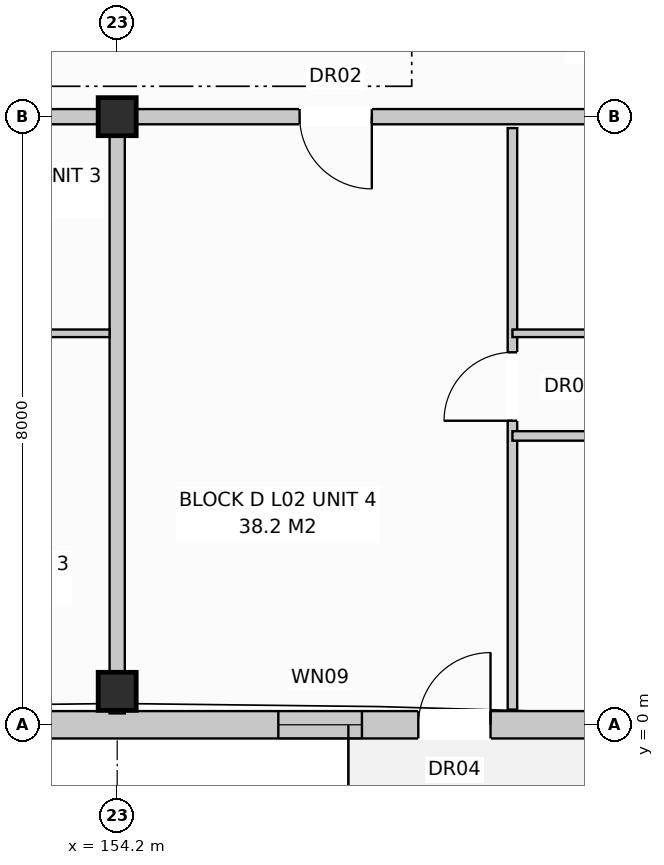
"""IFC4 building model, lengths in metres.
Left out: names, types, materials, properties, quantities, classifications, styles, units other than length and angle.
Written with IfcOpenShell. Run it as: python <this file> out.ifc"""

import sys

from ifc_helpers import new_model, si_unit, direction, frame, frame_2d, origin, origin_with_axes, origin_2d, place, context, subcontext, project, spatial, rectangle, extrude, element, fill, save


model = new_model("IFC4")
c1 = context("Model", 3, precision=1e-05, world=origin(), true_north=direction((0.0, 1.0)))
c2 = subcontext(c1, "Body", "Model", "MODEL_VIEW")
j1 = project(units=[si_unit("LENGTHUNIT", "METRE"), si_unit("PLANEANGLEUNIT", "RADIAN")], contexts=[c1])
p1 = place(None, origin())
s1 = spatial("IfcSite", under=j1, at=p1, CompositionType="ELEMENT")
p2 = place(p1, origin())
s2 = spatial("IfcBuilding", under=s1, at=p2, CompositionType="ELEMENT")
p3 = place(p2, frame((0.0, 0.0, 8.0)))
s3 = spatial("IfcBuildingStorey", under=s2, at=p3, CompositionType="ELEMENT", Elevation=8.0)
for number, where, z_axis, x_axis in (
    (1, (154.2, 0.44, 0.0), (0.0, 0.0, 1.0), (1.0, 0.0, 0.0)),
    (2, (154.2, 8.0, 0.0), (0.0, 0.0, 1.0), (1.0, 0.0, 0.0)),
):
    element("IfcColumn", number, at=place(p3, frame(where, z_axis=z_axis, x_axis=x_axis)), inside=s3, PredefinedType="COLUMN", context=c2, shape_type="SweptSolid", body=[
        extrude(rectangle(XDim=0.5, YDim=0.5, at=origin_2d()), origin(), (0.0, 0.0, 1.0), 3.2),
    ])
p4 = place(p3, frame((112.97, 0.0, 0.0), z_axis=(0.0, 0.0, 1.0), x_axis=(1.0, 0.0, 0.0)))
e3 = element("IfcWall", 3, at=p4, inside=s3, PredefinedType="STANDARD", context=c2, shape_type="SweptSolid", body=[
    extrude(rectangle(XDim=54.86, YDim=0.36, at=frame_2d((27.43, 0.0))), origin(), (0.0, 0.0, 1.0), 2.94),
])
p5 = place(p4, frame((2.788, 0.0, 0.0)))
e4 = element("IfcOpeningElement", 4, at=p5, cuts=e3, PredefinedType="OPENING", context=c2, shape_type="SweptSolid", body=[
    extrude(rectangle(XDim=0.95, YDim=2.1, at=frame_2d((0.475, 1.05))), frame((0.0, 0.192, 0.0), z_axis=(0.0, -1.0, 0.0), x_axis=(1.0, 0.0, 0.0)), (0.0, 0.0, 1.0), 0.384),
])
p6 = place(p4, frame((18.9, 0.0, 0.0)))
e5 = element("IfcOpeningElement", 5, at=p6, cuts=e3, PredefinedType="OPENING", context=c2, shape_type="SweptSolid", body=[
    extrude(rectangle(XDim=0.95, YDim=2.1, at=frame_2d((0.475, 1.05))), frame((0.0, 0.192, 0.0), z_axis=(0.0, -1.0, 0.0), x_axis=(1.0, 0.0, 0.0)), (0.0, 0.0, 1.0), 0.384),
])
p7 = place(p4, frame((30.792, 0.0, 0.0)))
e6 = element("IfcOpeningElement", 6, at=p7, cuts=e3, PredefinedType="OPENING", context=c2, shape_type="SweptSolid", body=[
    extrude(rectangle(XDim=0.95, YDim=2.1, at=frame_2d((0.475, 1.05))), frame((0.0, 0.192, 0.0), z_axis=(0.0, -1.0, 0.0), x_axis=(1.0, 0.0, 0.0)), (0.0, 0.0, 1.0), 0.384),
])
p8 = place(p4, frame((45.191, 0.0, 0.0)))
e7 = element("IfcOpeningElement", 7, at=p8, cuts=e3, PredefinedType="OPENING", context=c2, shape_type="SweptSolid", body=[
    extrude(rectangle(XDim=0.95, YDim=2.1, at=frame_2d((0.475, 1.05))), frame((0.0, 0.192, 0.0), z_axis=(0.0, -1.0, 0.0), x_axis=(1.0, 0.0, 0.0)), (0.0, 0.0, 1.0), 0.384),
])
p9 = place(p4, frame((0.645, 0.0, 0.8)))
e8 = element("IfcOpeningElement", 8, at=p9, cuts=e3, PredefinedType="OPENING", context=c2, shape_type="SweptSolid", body=[
    extrude(rectangle(XDim=1.8, YDim=1.7, at=frame_2d((0.9, 0.85))), frame((0.0, 0.192, 0.0), z_axis=(0.0, -1.0, 0.0), x_axis=(1.0, 0.0, 0.0)), (0.0, 0.0, 1.0), 0.384),
])
p10 = place(p4, frame((4.35, 0.0, 0.72)))
e9 = element("IfcOpeningElement", 9, at=p10, cuts=e3, PredefinedType="OPENING", context=c2, shape_type="SweptSolid", body=[
    extrude(rectangle(XDim=1.9, YDim=1.85, at=frame_2d((0.95, 0.925))), frame((0.0, 0.192, 0.0), z_axis=(0.0, -1.0, 0.0), x_axis=(1.0, 0.0, 0.0)), (0.0, 0.0, 1.0), 0.384),
])
p11 = place(p4, frame((10.45, 0.0, 0.72)))
e10 = element("IfcOpeningElement", 10, at=p11, cuts=e3, PredefinedType="OPENING", context=c2, shape_type="SweptSolid", body=[
    extrude(rectangle(XDim=1.1, YDim=1.5, at=frame_2d((0.55, 0.75))), frame((0.0, 0.192, 0.0), z_axis=(0.0, -1.0, 0.0), x_axis=(1.0, 0.0, 0.0)), (0.0, 0.0, 1.0), 0.384),
])
p12 = place(p4, frame((15.05, 0.0, 0.72)))
e11 = element("IfcOpeningElement", 11, at=p12, cuts=e3, PredefinedType="OPENING", context=c2, shape_type="SweptSolid", body=[
    extrude(rectangle(XDim=1.1, YDim=1.5, at=frame_2d((0.55, 0.75))), frame((0.0, 0.192, 0.0), z_axis=(0.0, -1.0, 0.0), x_axis=(1.0, 0.0, 0.0)), (0.0, 0.0, 1.0), 0.384),
])
p13 = place(p4, frame((22.75, 0.0, 0.8)))
e12 = element("IfcOpeningElement", 12, at=p13, cuts=e3, PredefinedType="OPENING", context=c2, shape_type="SweptSolid", body=[
    extrude(rectangle(XDim=1.9, YDim=1.85, at=frame_2d((0.95, 0.925))), frame((0.0, 0.192, 0.0), z_axis=(0.0, -1.0, 0.0), x_axis=(1.0, 0.0, 0.0)), (0.0, 0.0, 1.0), 0.384),
])
p14 = place(p4, frame((28.85, 0.0, 0.72)))
e13 = element("IfcOpeningElement", 13, at=p14, cuts=e3, PredefinedType="OPENING", context=c2, shape_type="SweptSolid", body=[
    extrude(rectangle(XDim=1.1, YDim=1.5, at=frame_2d((0.55, 0.75))), frame((0.0, 0.192, 0.0), z_axis=(0.0, -1.0, 0.0), x_axis=(1.0, 0.0, 0.0)), (0.0, 0.0, 1.0), 0.384),
])
p15 = place(p4, frame((34.9, 0.0, 0.8)))
e14 = element("IfcOpeningElement", 14, at=p15, cuts=e3, PredefinedType="OPENING", context=c2, shape_type="SweptSolid", body=[
    extrude(rectangle(XDim=1.8, YDim=1.7, at=frame_2d((0.9, 0.85))), frame((0.0, 0.192, 0.0), z_axis=(0.0, -1.0, 0.0), x_axis=(1.0, 0.0, 0.0)), (0.0, 0.0, 1.0), 0.384),
])
p16 = place(p4, frame((38.65, 0.0, 0.72)))
e15 = element("IfcOpeningElement", 15, at=p16, cuts=e3, PredefinedType="OPENING", context=c2, shape_type="SweptSolid", body=[
    extrude(rectangle(XDim=1.1, YDim=1.5, at=frame_2d((0.55, 0.75))), frame((0.0, 0.192, 0.0), z_axis=(0.0, -1.0, 0.0), x_axis=(1.0, 0.0, 0.0)), (0.0, 0.0, 1.0), 0.384),
])
p17 = place(p4, frame((43.35, 0.0, 0.72)))
e16 = element("IfcOpeningElement", 16, at=p17, cuts=e3, PredefinedType="OPENING", context=c2, shape_type="SweptSolid", body=[
    extrude(rectangle(XDim=1.1, YDim=1.5, at=frame_2d((0.55, 0.75))), frame((0.0, 0.192, 0.0), z_axis=(0.0, -1.0, 0.0), x_axis=(1.0, 0.0, 0.0)), (0.0, 0.0, 1.0), 0.384),
])
p18 = place(p4, frame((48.7, 0.0, 0.8)))
e17 = element("IfcOpeningElement", 17, at=p18, cuts=e3, PredefinedType="OPENING", context=c2, shape_type="SweptSolid", body=[
    extrude(rectangle(XDim=1.8, YDim=1.7, at=frame_2d((0.9, 0.85))), frame((0.0, 0.192, 0.0), z_axis=(0.0, -1.0, 0.0), x_axis=(1.0, 0.0, 0.0)), (0.0, 0.0, 1.0), 0.384),
])
p19 = place(p4, frame((52.25, 0.0, 0.72)))
e18 = element("IfcOpeningElement", 18, at=p19, cuts=e3, PredefinedType="OPENING", context=c2, shape_type="SweptSolid", body=[
    extrude(rectangle(XDim=1.1, YDim=1.5, at=frame_2d((0.55, 0.75))), frame((0.0, 0.192, 0.0), z_axis=(0.0, -1.0, 0.0), x_axis=(1.0, 0.0, 0.0)), (0.0, 0.0, 1.0), 0.384),
])
p20 = place(p3, frame((154.2, 7.85, 0.0), z_axis=(0.0, 0.0, 1.0), x_axis=(0.0, -1.0, 0.0)))
e19 = element("IfcWall", 19, at=p20, inside=s3, PredefinedType="PARTITIONING", context=c2, shape_type="SweptSolid", body=[
    extrude(rectangle(XDim=7.7, YDim=0.2, at=frame_2d((3.85, 0.0))), origin(), (0.0, 0.0, 1.0), 2.94),
])
p21 = place(p3, frame((133.5, 8.0, 0.0), z_axis=(0.0, 0.0, 1.0), x_axis=(1.0, 0.0, 0.0)))
e20 = element("IfcWall", 20, at=p21, inside=s3, PredefinedType="PARTITIONING", context=c2, shape_type="SweptSolid", body=[
    extrude(rectangle(XDim=20.7, YDim=0.2, at=frame_2d((10.35, 0.0))), origin(), (0.0, 0.0, 1.0), 2.38),
])
p22 = place(p21, frame((2.4, 0.0, 0.0)))
e21 = element("IfcOpeningElement", 21, at=p22, cuts=e20, PredefinedType="OPENING", context=c2, shape_type="SweptSolid", body=[
    extrude(rectangle(XDim=0.95, YDim=2.15, at=frame_2d((0.475, 1.075))), frame((0.0, 0.112, 0.0), z_axis=(0.0, -1.0, 0.0), x_axis=(1.0, 0.0, 0.0)), (0.0, 0.0, 1.0), 0.224),
])
p23 = place(p3, frame((139.8, 5.15, 0.0), z_axis=(0.0, 0.0, 1.0), x_axis=(1.0, 0.0, 0.0)))
e22 = element("IfcWall", 22, at=p23, inside=s3, PredefinedType="PARTITIONING", context=c2, shape_type="SweptSolid", body=[
    extrude(rectangle(XDim=14.3, YDim=0.1, at=frame_2d((7.15, 0.0))), origin(), (0.0, 0.0, 1.0), 2.94),
])
p24 = place(p23, frame((1.6, 0.0, 0.0)))
e23 = element("IfcOpeningElement", 23, at=p24, cuts=e22, PredefinedType="OPENING", context=c2, shape_type="SweptSolid", body=[
    extrude(rectangle(XDim=0.9, YDim=2.1, at=frame_2d((0.45, 1.05))), frame((0.0, 0.062, 0.0), z_axis=(0.0, -1.0, 0.0), x_axis=(1.0, 0.0, 0.0)), (0.0, 0.0, 1.0), 0.124),
])
p25 = place(p23, frame((5.1, 0.0, 0.0)))
e24 = element("IfcOpeningElement", 24, at=p25, cuts=e22, PredefinedType="OPENING", context=c2, shape_type="SweptSolid", body=[
    extrude(rectangle(XDim=0.85, YDim=2.05, at=frame_2d((0.425, 1.025))), frame((0.0, 0.062, 0.0), z_axis=(0.0, -1.0, 0.0), x_axis=(1.0, 0.0, 0.0)), (0.0, 0.0, 1.0), 0.124),
])
p26 = place(p23, frame((8.2, 0.0, 0.0)))
e25 = element("IfcOpeningElement", 25, at=p26, cuts=e22, PredefinedType="OPENING", context=c2, shape_type="SweptSolid", body=[
    extrude(rectangle(XDim=0.85, YDim=2.05, at=frame_2d((0.425, 1.025))), frame((0.0, 0.062, 0.0), z_axis=(0.0, -1.0, 0.0), x_axis=(1.0, 0.0, 0.0)), (0.0, 0.0, 1.0), 0.124),
])
p27 = place(p23, frame((11.6, 0.0, 0.0)))
e26 = element("IfcOpeningElement", 26, at=p27, cuts=e22, PredefinedType="OPENING", context=c2, shape_type="SweptSolid", body=[
    extrude(rectangle(XDim=0.85, YDim=2.05, at=frame_2d((0.425, 1.025))), frame((0.0, 0.062, 0.0), z_axis=(0.0, -1.0, 0.0), x_axis=(1.0, 0.0, 0.0)), (0.0, 0.0, 1.0), 0.124),
])
p28 = place(p3, frame((154.2, 8.0, 0.0), z_axis=(0.0, 0.0, 1.0), x_axis=(1.0, 0.0, 0.0)))
e27 = element("IfcWall", 27, at=p28, inside=s3, PredefinedType="PARTITIONING", context=c2, shape_type="SweptSolid", body=[
    extrude(rectangle(XDim=13.8, YDim=0.2, at=frame_2d((6.9, 0.0))), origin(), (0.0, 0.0, 1.0), 2.38),
])
p29 = place(p28, frame((2.4, 0.0, 0.0)))
e28 = element("IfcOpeningElement", 28, at=p29, cuts=e27, PredefinedType="OPENING", context=c2, shape_type="SweptSolid", body=[
    extrude(rectangle(XDim=0.95, YDim=2.15, at=frame_2d((0.475, 1.075))), frame((0.0, 0.112, 0.0), z_axis=(0.0, -1.0, 0.0), x_axis=(1.0, 0.0, 0.0)), (0.0, 0.0, 1.0), 0.224),
])
p30 = place(p3, frame((159.4, 7.85, 0.0), z_axis=(0.0, 0.0, 1.0), x_axis=(0.0, -1.0, 0.0)))
e29 = element("IfcWall", 29, at=p30, inside=s3, PredefinedType="PARTITIONING", context=c2, shape_type="SweptSolid", body=[
    extrude(rectangle(XDim=7.65, YDim=0.125, at=frame_2d((3.825, 0.0))), origin(), (0.0, 0.0, 1.0), 2.94),
])
p31 = place(p30, frame((2.95, 0.0, 0.0)))
e30 = element("IfcOpeningElement", 30, at=p31, cuts=e29, PredefinedType="OPENING", context=c2, shape_type="SweptSolid", body=[
    extrude(rectangle(XDim=0.9, YDim=2.1, at=frame_2d((0.45, 1.05))), frame((0.0, 0.074, 0.0), z_axis=(0.0, -1.0, 0.0), x_axis=(1.0, 0.0, 0.0)), (0.0, 0.0, 1.0), 0.149),
])
p32 = place(p3, frame((159.4, 5.15, 0.0), z_axis=(0.0, 0.0, 1.0), x_axis=(1.0, 0.0, 0.0)))
e31 = element("IfcWall", 31, at=p32, inside=s3, PredefinedType="PARTITIONING", context=c2, shape_type="SweptSolid", body=[
    extrude(rectangle(XDim=8.5, YDim=0.1, at=frame_2d((4.25, 0.0))), origin(), (0.0, 0.0, 1.0), 2.94),
])
p33 = place(p32, frame((1.0, 0.0, 0.0)))
e32 = element("IfcOpeningElement", 32, at=p33, cuts=e31, PredefinedType="OPENING", context=c2, shape_type="SweptSolid", body=[
    extrude(rectangle(XDim=0.85, YDim=2.1, at=frame_2d((0.425, 1.05))), frame((0.0, 0.062, 0.0), z_axis=(0.0, -1.0, 0.0), x_axis=(1.0, 0.0, 0.0)), (0.0, 0.0, 1.0), 0.124),
])
p34 = place(p32, frame((3.4, 0.0, 0.0)))
e33 = element("IfcOpeningElement", 33, at=p34, cuts=e31, PredefinedType="OPENING", context=c2, shape_type="SweptSolid", body=[
    extrude(rectangle(XDim=0.85, YDim=2.05, at=frame_2d((0.425, 1.025))), frame((0.0, 0.062, 0.0), z_axis=(0.0, -1.0, 0.0), x_axis=(1.0, 0.0, 0.0)), (0.0, 0.0, 1.0), 0.124),
])
p35 = place(p32, frame((6.2, 0.0, 0.0)))
e34 = element("IfcOpeningElement", 34, at=p35, cuts=e31, PredefinedType="OPENING", context=c2, shape_type="SweptSolid", body=[
    extrude(rectangle(XDim=0.85, YDim=2.05, at=frame_2d((0.425, 1.025))), frame((0.0, 0.062, 0.0), z_axis=(0.0, -1.0, 0.0), x_axis=(1.0, 0.0, 0.0)), (0.0, 0.0, 1.0), 0.124),
])
p36 = place(p3, frame((159.4, 3.8, 0.0), z_axis=(0.0, 0.0, 1.0), x_axis=(1.0, 0.0, 0.0)))
e35 = element("IfcWall", 35, at=p36, inside=s3, PredefinedType="PARTITIONING", context=c2, shape_type="SweptSolid", body=[
    extrude(rectangle(XDim=8.5, YDim=0.125, at=frame_2d((4.25, 0.0))), origin(), (0.0, 0.0, 1.0), 2.94),
])
p37 = place(p36, frame((1.5, 0.0, 0.0)))
e36 = element("IfcOpeningElement", 36, at=p37, cuts=e35, PredefinedType="OPENING", context=c2, shape_type="SweptSolid", body=[
    extrude(rectangle(XDim=0.9, YDim=2.1, at=frame_2d((0.45, 1.05))), frame((0.0, 0.074, 0.0), z_axis=(0.0, -1.0, 0.0), x_axis=(1.0, 0.0, 0.0)), (0.0, 0.0, 1.0), 0.149),
])
p38 = place(p36, frame((5.6, 0.0, 0.0)))
e37 = element("IfcOpeningElement", 37, at=p38, cuts=e35, PredefinedType="OPENING", context=c2, shape_type="SweptSolid", body=[
    extrude(rectangle(XDim=0.9, YDim=2.1, at=frame_2d((0.45, 1.05))), frame((0.0, 0.074, 0.0), z_axis=(0.0, -1.0, 0.0), x_axis=(1.0, 0.0, 0.0)), (0.0, 0.0, 1.0), 0.149),
])
p39 = place(p8, origin_with_axes())
e38 = element("IfcDoor", 38, at=p39, inside=s3, OperationType="SINGLE_SWING_RIGHT", PredefinedType="DOOR", context=c2, shape_type="SweptSolid", body=[
    extrude(rectangle(XDim=0.95, YDim=2.1, at=frame_2d((0.475, 1.05))), frame((0.0, 0.025, 0.0), z_axis=(0.0, -1.0, 0.0), x_axis=(1.0, 0.0, 0.0)), (0.0, 0.0, 1.0), 0.05),
])
fill(e7, e38)
p40 = place(p17, origin_with_axes())
e39 = element("IfcWindow", 39, at=p40, inside=s3, PartitioningType="SINGLE_PANEL", PredefinedType="WINDOW", context=c2, shape_type="SweptSolid", body=[
    extrude(rectangle(XDim=1.1, YDim=1.5, at=frame_2d((0.55, 0.75))), frame((0.0, 0.03, 0.0), z_axis=(0.0, -1.0, 0.0), x_axis=(1.0, 0.0, 0.0)), (0.0, 0.0, 1.0), 0.06),
])
fill(e16, e39)
p41 = place(p29, frame((0.95, 0.0, 0.0), z_axis=(0.0, 0.0, 1.0), x_axis=(-1.0, 0.0, 0.0)))
e40 = element("IfcDoor", 40, at=p41, inside=s3, OperationType="SINGLE_SWING_RIGHT", PredefinedType="DOOR", context=c2, shape_type="SweptSolid", body=[
    extrude(rectangle(XDim=0.95, YDim=2.15, at=frame_2d((0.475, 1.075))), frame((0.0, 0.025, 0.0), z_axis=(0.0, -1.0, 0.0), x_axis=(1.0, 0.0, 0.0)), (0.0, 0.0, 1.0), 0.05),
])
fill(e28, e40)
p42 = place(p31, frame((0.9, 0.0, 0.0), z_axis=(0.0, 0.0, 1.0), x_axis=(-1.0, 0.0, 0.0)))
e41 = element("IfcDoor", 41, at=p42, inside=s3, OperationType="SINGLE_SWING_RIGHT", PredefinedType="DOOR", context=c2, shape_type="SweptSolid", body=[
    extrude(rectangle(XDim=0.9, YDim=2.1, at=frame_2d((0.45, 1.05))), frame((0.0, 0.025, 0.0), z_axis=(0.0, -1.0, 0.0), x_axis=(1.0, 0.0, 0.0)), (0.0, 0.0, 1.0), 0.05),
])
fill(e30, e41)
save(model, sys.argv[1])
